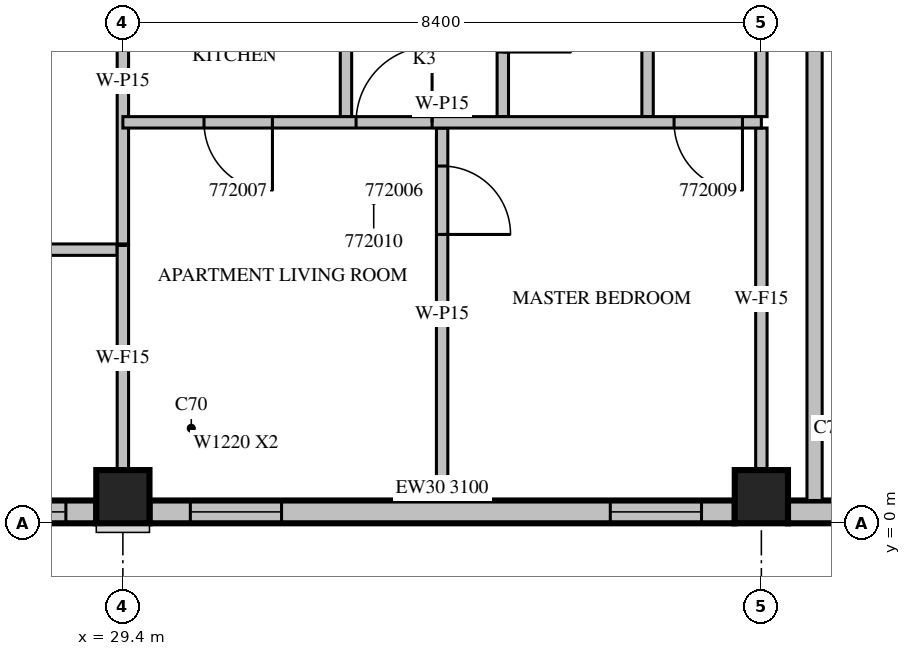
"""IFC4 building model, lengths in metres.
Left out: names, types, materials, properties, quantities, classifications, styles, units other than length and angle.
Written with IfcOpenShell. Run it as: python <this file> out.ifc"""

import sys

from ifc_helpers import new_model, si_unit, direction, frame, frame_2d, origin, origin_2d, place, context, subcontext, project, spatial, rectangle, extrude, source, transform, mapped, element, fill, save


model = new_model("IFC4")
c1 = context("Model", 3, precision=1e-05, world=origin(), true_north=direction((0.0, 1.0)))
c2 = subcontext(c1, "Body", "Model", "MODEL_VIEW")
j1 = project(units=[si_unit("LENGTHUNIT", "METRE"), si_unit("PLANEANGLEUNIT", "RADIAN")], contexts=[c1])
p1 = place(None, origin())
s1 = spatial("IfcSite", under=j1, at=p1, CompositionType="ELEMENT")
p2 = place(p1, origin())
s2 = spatial("IfcBuilding", under=s1, at=p2, CompositionType="ELEMENT")
p3 = place(p2, frame((0.0, 0.0, 312.5)))
s3 = spatial("IfcBuildingStorey", under=s2, at=p3, CompositionType="ELEMENT", Elevation=312.5)
m1 = source(origin(), c2, "Body", "SweptSolid", [
    extrude(rectangle(XDim=0.7, YDim=0.7, at=origin_2d()), origin(), (0.0, 0.0, 1.0), 3.5),
])
for number, where, z_axis, x_axis in (
    (1, (29.4, 0.35, 0.0), (0.0, 0.0, 1.0), (1.0, 0.0, 0.0)),
    (2, (37.8, 0.35, 0.0), (0.0, 0.0, 1.0), (1.0, 0.0, 0.0)),
):
    element("IfcColumn", number, at=place(p3, frame(where, z_axis=z_axis, x_axis=x_axis)), inside=s3, PredefinedType="COLUMN", context=c2, shape_type="MappedRepresentation", body=[
        mapped(m1, transform((0.0, 0.0, 0.0), scale=1.0)),
    ])
m2 = source(origin(), c2, "Body", "SweptSolid", [
    extrude(rectangle(XDim=7.7, YDim=0.3, at=frame_2d((3.85, 0.0))), origin(), (0.0, 0.0, 1.0), 3.1),
])
p4 = place(p3, frame((21.35, 0.15, 0.0), z_axis=(0.0, 0.0, 1.0), x_axis=(1.0, 0.0, 0.0)))
e3 = element("IfcWall", 3, at=p4, inside=s3, PredefinedType="STANDARD", context=c2, shape_type="MappedRepresentation", body=[
    mapped(m2, transform((0.0, 0.0, 0.0), scale=1.0)),
])
m3 = source(origin(), c2, "Body", "SweptSolid", [
    extrude(rectangle(XDim=2.4, YDim=2.0, at=frame_2d((1.2, 1.0))), frame((0.0, 0.16, 0.0), z_axis=(0.0, -1.0, 0.0), x_axis=(1.0, 0.0, 0.0)), (0.0, 0.0, 1.0), 0.32),
])
p5 = place(p4, frame((1.0, 0.0, 0.6)))
e4 = element("IfcOpeningElement", 4, at=p5, cuts=e3, PredefinedType="OPENING", context=c2, shape_type="MappedRepresentation", body=[
    mapped(m3, transform((0.0, 0.0, 0.0), scale=1.0)),
])
p6 = place(p4, frame((4.9, 0.0, 0.6)))
e5 = element("IfcOpeningElement", 5, at=p6, cuts=e3, PredefinedType="OPENING", context=c2, shape_type="MappedRepresentation", body=[
    mapped(m3, transform((0.0, 0.0, 0.0), scale=1.0)),
])
p7 = place(p3, frame((29.75, 0.15, 0.0), z_axis=(0.0, 0.0, 1.0), x_axis=(1.0, 0.0, 0.0)))
e6 = element("IfcWall", 6, at=p7, inside=s3, PredefinedType="STANDARD", context=c2, shape_type="MappedRepresentation", body=[
    mapped(m2, transform((0.0, 0.0, 0.0), scale=1.0)),
])
m4 = source(origin(), c2, "Body", "SweptSolid", [
    extrude(rectangle(XDim=1.2, YDim=2.0, at=frame_2d((0.6, 1.0))), frame((0.0, 0.16, 0.0), z_axis=(0.0, -1.0, 0.0), x_axis=(1.0, 0.0, 0.0)), (0.0, 0.0, 1.0), 0.32),
])
p8 = place(p7, frame((0.537, 0.0, 0.6)))
e7 = element("IfcOpeningElement", 7, at=p8, cuts=e6, PredefinedType="OPENING", context=c2, shape_type="MappedRepresentation", body=[
    mapped(m4, transform((0.0, 0.0, 0.0), scale=1.0)),
])
p9 = place(p7, frame((6.062, 0.0, 0.6)))
e8 = element("IfcOpeningElement", 8, at=p9, cuts=e6, PredefinedType="OPENING", context=c2, shape_type="MappedRepresentation", body=[
    mapped(m4, transform((0.0, 0.0, 0.0), scale=1.0)),
])
m5 = source(origin(), c2, "Body", "SweptSolid", [
    extrude(rectangle(XDim=2.05, YDim=0.3, at=frame_2d((1.025, 0.0))), origin(), (0.0, 0.0, 1.0), 3.1),
])
p10 = place(p3, frame((38.15, 0.15, 0.0), z_axis=(0.0, 0.0, 1.0), x_axis=(1.0, 0.0, 0.0)))
e9 = element("IfcWall", 9, at=p10, inside=s3, PredefinedType="STANDARD", context=c2, shape_type="MappedRepresentation", body=[
    mapped(m5, transform((0.0, 0.0, 0.0), scale=1.0)),
])
m6 = source(origin(), c2, "Body", "SweptSolid", [
    extrude(rectangle(XDim=8.0, YDim=0.2, at=frame_2d((4.0, 0.0))), origin(), (0.0, 0.0, 1.0), 3.1),
])
p11 = place(p3, frame((38.5, 0.3, 0.0), z_axis=(0.0, 0.0, 1.0), x_axis=(0.0, 1.0, 0.0)))
e10 = element("IfcWall", 10, at=p11, inside=s3, PredefinedType="PARTITIONING", context=c2, shape_type="MappedRepresentation", body=[
    mapped(m6, transform((0.0, 0.0, 0.0), scale=1.0)),
])
m7 = source(origin(), c2, "Body", "SweptSolid", [
    extrude(rectangle(XDim=4.275, YDim=0.15, at=frame_2d((2.138, 0.0))), origin(), (0.0, 0.0, 1.0), 3.1),
])
p12 = place(p3, frame((29.4, 3.675, 0.0), z_axis=(0.0, 0.0, 1.0), x_axis=(0.0, 1.0, 0.0)))
e11 = element("IfcWall", 11, at=p12, inside=s3, PredefinedType="PARTITIONING", context=c2, shape_type="MappedRepresentation", body=[
    mapped(m7, transform((0.0, 0.0, 0.0), scale=1.0)),
])
m8 = source(origin(), c2, "Body", "SweptSolid", [
    extrude(rectangle(XDim=7.725, YDim=0.15, at=frame_2d((3.862, 0.0))), origin(), (0.0, 0.0, 1.0), 3.1),
])
p13 = place(p3, frame((21.6, 3.6, 0.0), z_axis=(0.0, 0.0, 1.0), x_axis=(1.0, 0.0, 0.0)))
e12 = element("IfcWall", 12, at=p13, inside=s3, PredefinedType="PARTITIONING", context=c2, shape_type="MappedRepresentation", body=[
    mapped(m8, transform((0.0, 0.0, 0.0), scale=1.0)),
])
m9 = source(origin(), c2, "Body", "SweptSolid", [
    extrude(rectangle(XDim=1.0, YDim=2.1, at=frame_2d((0.5, 1.05))), frame((0.0, 0.085, 0.0), z_axis=(0.0, -1.0, 0.0), x_axis=(1.0, 0.0, 0.0)), (0.0, 0.0, 1.0), 0.17),
])
p14 = place(p13, frame((0.45, 0.0, 0.0)))
e13 = element("IfcOpeningElement", 13, at=p14, cuts=e12, PredefinedType="OPENING", context=c2, shape_type="MappedRepresentation", body=[
    mapped(m9, transform((0.0, 0.0, 0.0), scale=1.0)),
])
p15 = place(p3, frame((33.6, 0.3, 0.0), z_axis=(0.0, 0.0, 1.0), x_axis=(0.0, 1.0, 0.0)))
e14 = element("IfcWall", 14, at=p15, inside=s3, PredefinedType="PARTITIONING", context=c2, shape_type="SweptSolid", body=[
    extrude(rectangle(XDim=4.9, YDim=0.15, at=frame_2d((2.45, 0.0))), origin(), (0.0, 0.0, 1.0), 3.1),
])
m10 = source(origin(), c2, "Body", "SweptSolid", [
    extrude(rectangle(XDim=0.9, YDim=2.1, at=frame_2d((0.45, 1.05))), frame((0.0, 0.085, 0.0), z_axis=(0.0, -1.0, 0.0), x_axis=(1.0, 0.0, 0.0)), (0.0, 0.0, 1.0), 0.17),
])
p16 = place(p15, frame((3.5, 0.0, 0.0)))
e15 = element("IfcOpeningElement", 15, at=p16, cuts=e14, PredefinedType="OPENING", context=c2, shape_type="MappedRepresentation", body=[
    mapped(m10, transform((0.0, 0.0, 0.0), scale=1.0)),
])
p17 = place(p3, frame((32.335, 5.35, 0.0), z_axis=(0.0, 0.0, 1.0), x_axis=(0.0, 1.0, 0.0)))
e16 = element("IfcWall", 16, at=p17, inside=s3, PredefinedType="PARTITIONING", context=c2, shape_type="SweptSolid", body=[
    extrude(rectangle(XDim=2.6, YDim=0.15, at=frame_2d((1.3, 0.0))), origin(), (0.0, 0.0, 1.0), 3.1),
])
m11 = source(origin(), c2, "Body", "SweptSolid", [
    extrude(rectangle(XDim=2.6, YDim=0.15, at=frame_2d((1.3, 0.0))), origin(), (0.0, 0.0, 1.0), 3.1),
])
p18 = place(p3, frame((34.398, 5.35, 0.0), z_axis=(0.0, 0.0, 1.0), x_axis=(0.0, 1.0, 0.0)))
e17 = element("IfcWall", 17, at=p18, inside=s3, PredefinedType="PARTITIONING", context=c2, shape_type="MappedRepresentation", body=[
    mapped(m11, transform((0.0, 0.0, 0.0), scale=1.0)),
])
p19 = place(p18, frame((0.85, 0.0, 0.0)))
e18 = element("IfcOpeningElement", 18, at=p19, cuts=e17, PredefinedType="OPENING", context=c2, shape_type="MappedRepresentation", body=[
    mapped(m10, transform((0.0, 0.0, 0.0), scale=1.0)),
])
p20 = place(p3, frame((36.303, 5.35, 0.0), z_axis=(0.0, 0.0, 1.0), x_axis=(0.0, 1.0, 0.0)))
e19 = element("IfcWall", 19, at=p20, inside=s3, PredefinedType="PARTITIONING", context=c2, shape_type="MappedRepresentation", body=[
    mapped(m11, transform((0.0, 0.0, 0.0), scale=1.0)),
])
m12 = source(origin(), c2, "Body", "SweptSolid", [
    extrude(rectangle(XDim=2.956, YDim=0.15, at=frame_2d((1.478, 0.0))), origin(), (0.0, 0.0, 1.0), 3.1),
])
p21 = place(p3, frame((29.4, 0.699, 0.0), z_axis=(0.0, 0.0, 1.0), x_axis=(0.0, 1.0, 0.0)))
e20 = element("IfcWall", 20, at=p21, inside=s3, PredefinedType="PARTITIONING", context=c2, shape_type="MappedRepresentation", body=[
    mapped(m12, transform((0.0, 0.0, 0.0), scale=1.0)),
])
p22 = place(p3, frame((37.8, 0.699, 0.0), z_axis=(0.0, 0.0, 1.0), x_axis=(0.0, 1.0, 0.0)))
e21 = element("IfcWall", 21, at=p22, inside=s3, PredefinedType="PARTITIONING", context=c2, shape_type="SweptSolid", body=[
    extrude(rectangle(XDim=4.501, YDim=0.15, at=frame_2d((2.251, 0.0))), origin(), (0.0, 0.0, 1.0), 3.1),
])
p23 = place(p3, frame((37.8, 5.35, 0.0), z_axis=(0.0, 0.0, 1.0), x_axis=(0.0, 1.0, 0.0)))
e22 = element("IfcWall", 22, at=p23, inside=s3, PredefinedType="PARTITIONING", context=c2, shape_type="MappedRepresentation", body=[
    mapped(m11, transform((0.0, 0.0, 0.0), scale=1.0)),
])
m13 = source(origin(), c2, "Body", "SweptSolid", [
    extrude(rectangle(XDim=8.4, YDim=0.15, at=frame_2d((4.2, 0.0))), origin(), (0.0, 0.0, 1.0), 3.1),
])
p24 = place(p3, frame((37.8, 5.275, 0.0), z_axis=(0.0, 0.0, 1.0), x_axis=(-1.0, 0.0, 0.0)))
e23 = element("IfcWall", 23, at=p24, inside=s3, PredefinedType="PARTITIONING", context=c2, shape_type="MappedRepresentation", body=[
    mapped(m13, transform((0.0, 0.0, 0.0), scale=1.0)),
])
p25 = place(p24, frame((4.332, 0.0, 0.0)))
e24 = element("IfcOpeningElement", 24, at=p25, cuts=e23, PredefinedType="OPENING", context=c2, shape_type="MappedRepresentation", body=[
    mapped(m9, transform((0.0, 0.0, 0.0), scale=1.0)),
])
p26 = place(p24, frame((6.433, 0.0, 0.0)))
e25 = element("IfcOpeningElement", 25, at=p26, cuts=e23, PredefinedType="OPENING", context=c2, shape_type="MappedRepresentation", body=[
    mapped(m10, transform((0.0, 0.0, 0.0), scale=1.0)),
])
p27 = place(p24, frame((0.248, 0.0, 0.0)))
e26 = element("IfcOpeningElement", 26, at=p27, cuts=e23, PredefinedType="OPENING", context=c2, shape_type="MappedRepresentation", body=[
    mapped(m10, transform((0.0, 0.0, 0.0), scale=1.0)),
])
m14 = source(origin(), c2, "Body", "SweptSolid", [
    extrude(rectangle(XDim=2.4, YDim=2.0, at=frame_2d((1.2, 1.0))), frame((0.0, 0.03, 0.0), z_axis=(0.0, -1.0, 0.0), x_axis=(1.0, 0.0, 0.0)), (0.0, 0.0, 1.0), 0.06),
])
p28 = place(p6, origin())
e27 = element("IfcWindow", 27, at=p28, inside=s3, PartitioningType="SINGLE_PANEL", PredefinedType="WINDOW", context=c2, shape_type="MappedRepresentation", body=[
    mapped(m14, transform((0.0, 0.0, 0.0), scale=1.0)),
])
fill(e5, e27)
m15 = source(origin(), c2, "Body", "SweptSolid", [
    extrude(rectangle(XDim=1.2, YDim=2.0, at=frame_2d((0.6, 1.0))), frame((0.0, 0.03, 0.0), z_axis=(0.0, -1.0, 0.0), x_axis=(1.0, 0.0, 0.0)), (0.0, 0.0, 1.0), 0.06),
])
p29 = place(p8, origin())
e28 = element("IfcWindow", 28, at=p29, inside=s3, PartitioningType="SINGLE_PANEL", PredefinedType="WINDOW", context=c2, shape_type="MappedRepresentation", body=[
    mapped(m15, transform((0.0, 0.0, 0.0), scale=1.0)),
])
fill(e7, e28)
p30 = place(p9, origin())
e29 = element("IfcWindow", 29, at=p30, inside=s3, PartitioningType="SINGLE_PANEL", PredefinedType="WINDOW", context=c2, shape_type="MappedRepresentation", body=[
    mapped(m15, transform((0.0, 0.0, 0.0), scale=1.0)),
])
fill(e8, e29)
m16 = source(origin(), c2, "Body", "SweptSolid", [
    extrude(rectangle(XDim=1.0, YDim=2.1, at=frame_2d((0.5, 1.05))), frame((0.0, 0.025, 0.0), z_axis=(0.0, -1.0, 0.0), x_axis=(1.0, 0.0, 0.0)), (0.0, 0.0, 1.0), 0.05),
])
p31 = place(p25, origin())
e30 = element("IfcDoor", 30, at=p31, inside=s3, OperationType="SINGLE_SWING_RIGHT", PredefinedType="DOOR", context=c2, shape_type="MappedRepresentation", body=[
    mapped(m16, transform((0.0, 0.0, 0.0), scale=1.0)),
])
fill(e24, e30)
m17 = source(origin(), c2, "Body", "SweptSolid", [
    extrude(rectangle(XDim=0.9, YDim=2.1, at=frame_2d((0.45, 1.05))), frame((0.0, 0.025, 0.0), z_axis=(0.0, -1.0, 0.0), x_axis=(1.0, 0.0, 0.0)), (0.0, 0.0, 1.0), 0.05),
])
p32 = place(p26, origin())
e31 = element("IfcDoor", 31, at=p32, inside=s3, OperationType="SINGLE_SWING_LEFT", PredefinedType="DOOR", context=c2, shape_type="MappedRepresentation", body=[
    mapped(m17, transform((0.0, 0.0, 0.0), scale=1.0)),
])
fill(e25, e31)
p33 = place(p19, origin())
e32 = element("IfcDoor", 32, at=p33, inside=s3, OperationType="SINGLE_SWING_RIGHT", PredefinedType="DOOR", context=c2, shape_type="MappedRepresentation", body=[
    mapped(m17, transform((0.0, 0.0, 0.0), scale=1.0)),
])
fill(e18, e32)
p34 = place(p27, origin())
e33 = element("IfcDoor", 33, at=p34, inside=s3, OperationType="SINGLE_SWING_LEFT", PredefinedType="DOOR", context=c2, shape_type="MappedRepresentation", body=[
    mapped(m17, transform((0.0, 0.0, 0.0), scale=1.0)),
])
fill(e26, e33)
p35 = place(p16, origin())
e34 = element("IfcDoor", 34, at=p35, inside=s3, OperationType="SINGLE_SWING_RIGHT", PredefinedType="DOOR", context=c2, shape_type="MappedRepresentation", body=[
    mapped(m17, transform((0.0, 0.0, 0.0), scale=1.0)),
])
fill(e15, e34)
save(model, sys.argv[1])
